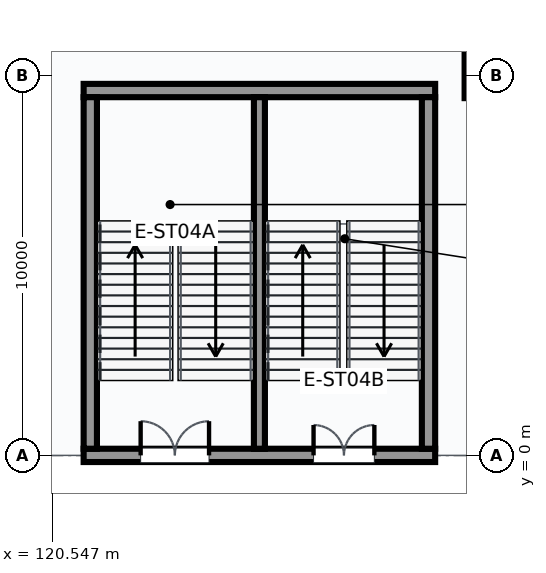
"""IFC4 building model, lengths in metres.
Left out: names, types, materials, properties, quantities, classifications, styles, units other than length and angle.
Written with IfcOpenShell. Run it as: python <this file> out.ifc"""

import sys

from ifc_helpers import new_model, si_unit, direction, frame, frame_2d, origin, origin_2d, place, context, subcontext, project, spatial, rectangle, extrude, element, fill, save


model = new_model("IFC4")
c1 = context("Model", 3, precision=1e-05, world=origin(), true_north=direction((0.0, 1.0)))
c2 = subcontext(c1, "Body", "Model", "MODEL_VIEW")
j1 = project(units=[si_unit("LENGTHUNIT", "METRE"), si_unit("PLANEANGLEUNIT", "RADIAN")], contexts=[c1])
p1 = place(None, origin())
s1 = spatial("IfcSite", under=j1, at=p1, CompositionType="ELEMENT")
p2 = place(p1, origin())
s2 = spatial("IfcBuilding", under=s1, at=p2, CompositionType="ELEMENT")
p3 = place(p2, origin())
s3 = spatial("IfcBuildingStorey", under=s2, at=p3, CompositionType="ELEMENT", Elevation=0.0)
p4 = place(p3, frame((132.0, 10.0, 0.0), z_axis=(0.0, 0.0, 1.0), x_axis=(1.0, 0.0, 0.0)))
e1 = element("IfcColumn", 1, at=p4, inside=s3, PredefinedType="COLUMN", context=c2, shape_type="SweptSolid", body=[
    extrude(rectangle(XDim=1.2, YDim=1.2, at=origin_2d()), origin(), (0.0, 0.0, 1.0), 5.4),
])
p5 = place(p3, frame((121.375, 0.0, 0.0), z_axis=(0.0, 0.0, 1.0), x_axis=(1.0, 0.0, 0.0)))
e2 = element("IfcWall", 2, at=p5, inside=s3, PredefinedType="SHEAR", context=c2, shape_type="SweptSolid", body=[
    extrude(rectangle(XDim=9.25, YDim=0.35, at=frame_2d((4.625, 0.0))), origin(), (0.0, 0.0, 1.0), 4.496),
])
p6 = place(p5, frame((1.5, 0.0, 0.0)))
e3 = element("IfcOpeningElement", 3, at=p6, cuts=e2, PredefinedType="OPENING", context=c2, shape_type="SweptSolid", body=[
    extrude(rectangle(XDim=1.8, YDim=2.2, at=frame_2d((0.9, 1.1))), frame((0.0, 0.185, 0.0), z_axis=(0.0, -1.0, 0.0), x_axis=(1.0, 0.0, 0.0)), (0.0, 0.0, 1.0), 0.37),
])
p7 = place(p5, frame((6.05, 0.0, 0.0)))
e4 = element("IfcOpeningElement", 4, at=p7, cuts=e2, PredefinedType="OPENING", context=c2, shape_type="SweptSolid", body=[
    extrude(rectangle(XDim=1.6, YDim=2.2, at=frame_2d((0.8, 1.1))), frame((0.0, 0.185, 0.0), z_axis=(0.0, -1.0, 0.0), x_axis=(1.0, 0.0, 0.0)), (0.0, 0.0, 1.0), 0.37),
])
for number, where, z_axis, x_axis in (
    (5, (121.375, 9.6, 0.0), (0.0, 0.0, 1.0), (1.0, 0.0, 0.0)),
    (6, (121.55, 0.175, 0.0), (0.0, 0.0, 1.0), (0.0, 1.0, 0.0)),
    (7, (130.45, 0.175, 0.0), (0.0, 0.0, 1.0), (0.0, 1.0, 0.0)),
):
    element("IfcWall", number, at=place(p3, frame(where, z_axis=z_axis, x_axis=x_axis)), inside=s3, PredefinedType="SHEAR", context=c2, shape_type="SweptSolid", body=[
        extrude(rectangle(XDim=9.25, YDim=0.35, at=frame_2d((4.625, 0.0))), origin(), (0.0, 0.0, 1.0), 5.4),
    ])
p8 = place(p3, frame((126.0, 0.175, 0.0), z_axis=(0.0, 0.0, 1.0), x_axis=(0.0, 1.0, 0.0)))
e8 = element("IfcWall", 8, at=p8, inside=s3, PredefinedType="SHEAR", context=c2, shape_type="SweptSolid", body=[
    extrude(rectangle(XDim=9.25, YDim=0.29, at=frame_2d((4.625, 0.0))), origin(), (0.0, 0.0, 1.0), 5.4),
])
p9 = place(p6, frame((1.8, 0.0, 0.0), z_axis=(0.0, 0.0, 1.0), x_axis=(-1.0, 0.0, 0.0)))
e9 = element("IfcDoor", 9, at=p9, inside=s3, OperationType="DOUBLE_DOOR_SINGLE_SWING", PredefinedType="DOOR", context=c2, shape_type="SweptSolid", body=[
    extrude(rectangle(XDim=1.8, YDim=2.2, at=frame_2d((0.9, 1.1))), frame((0.0, 0.025, 0.0), z_axis=(0.0, -1.0, 0.0), x_axis=(1.0, 0.0, 0.0)), (0.0, 0.0, 1.0), 0.05),
])
fill(e3, e9)
p10 = place(p7, frame((1.6, 0.0, 0.0), z_axis=(0.0, 0.0, 1.0), x_axis=(-1.0, 0.0, 0.0)))
e10 = element("IfcDoor", 10, at=p10, inside=s3, OperationType="DOUBLE_DOOR_SINGLE_SWING", PredefinedType="DOOR", context=c2, shape_type="SweptSolid", body=[
    extrude(rectangle(XDim=1.6, YDim=2.2, at=frame_2d((0.8, 1.1))), frame((0.0, 0.025, 0.0), z_axis=(0.0, -1.0, 0.0), x_axis=(1.0, 0.0, 0.0)), (0.0, 0.0, 1.0), 0.05),
])
fill(e4, e10)
save(model, sys.argv[1])
